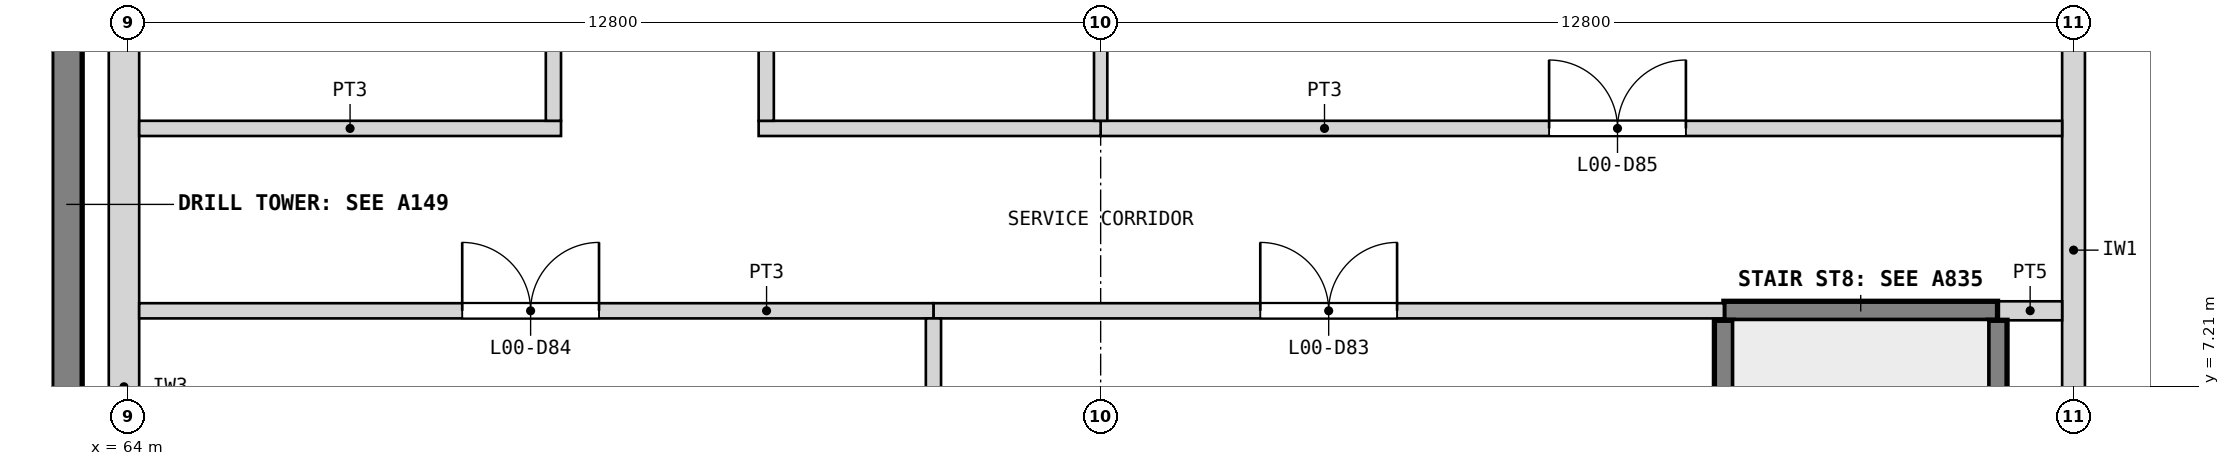
"""IFC4 building model, lengths in metres.
Left out: names, types, materials, properties, quantities, classifications, styles, units other than length and angle.
Written with IfcOpenShell. Run it as: python <this file> out.ifc"""

import sys

from ifc_helpers import new_model, si_unit, direction, frame, frame_2d, origin, place, context, subcontext, project, spatial, rectangle, extrude, element, fill, save


model = new_model("IFC4")
c1 = context("Model", 3, precision=1e-05, world=origin(), true_north=direction((0.0, 1.0)))
c2 = subcontext(c1, "Body", "Model", "MODEL_VIEW")
j1 = project(units=[si_unit("LENGTHUNIT", "METRE"), si_unit("PLANEANGLEUNIT", "RADIAN")], contexts=[c1])
p1 = place(None, origin())
s1 = spatial("IfcSite", under=j1, at=p1, CompositionType="ELEMENT")
p2 = place(p1, origin())
s2 = spatial("IfcBuilding", under=s1, at=p2, CompositionType="ELEMENT")
p3 = place(p2, origin())
s3 = spatial("IfcBuildingStorey", under=s2, at=p3, CompositionType="ELEMENT", Elevation=0.0)
p4 = place(p3, frame((63.2, 5.0, -0.25), z_axis=(0.0, 0.0, 1.0), x_axis=(0.0, 1.0, 0.0)))
e1 = element("IfcWall", 1, at=p4, inside=s3, PredefinedType="SHEAR", context=c2, shape_type="SweptSolid", body=[
    extrude(rectangle(XDim=9.2, YDim=0.4, at=frame_2d((4.6, 0.0))), origin(), (0.0, 0.0, 1.0), 4.45),
])
p5 = place(p3, frame((89.6, 0.35, 0.0), z_axis=(0.0, 0.0, 1.0), x_axis=(0.0, 1.0, 0.0)))
e2 = element("IfcWall", 2, at=p5, inside=s3, PredefinedType="SOLIDWALL", context=c2, shape_type="SweptSolid", body=[
    extrude(rectangle(XDim=13.7, YDim=0.3, at=frame_2d((6.85, 0.0))), origin(), (0.0, 0.0, 1.0), 3.0),
])
p6 = place(p5, frame((0.65, 0.0, 0.3)))
e3 = element("IfcOpeningElement", 3, at=p6, cuts=e2, PredefinedType="OPENING", context=c2, shape_type="SweptSolid", body=[
    extrude(rectangle(XDim=1.6, YDim=2.4, at=frame_2d((0.8, 1.2))), frame((0.0, 0.16, 0.0), z_axis=(0.0, -1.0, 0.0), x_axis=(1.0, 0.0, 0.0)), (0.0, 0.0, 1.0), 0.32),
])
p7 = place(p5, frame((4.25, 0.0, 0.3)))
e4 = element("IfcOpeningElement", 4, at=p7, cuts=e2, PredefinedType="OPENING", context=c2, shape_type="SweptSolid", body=[
    extrude(rectangle(XDim=1.6, YDim=2.4, at=frame_2d((0.8, 1.2))), frame((0.0, 0.16, 0.0), z_axis=(0.0, -1.0, 0.0), x_axis=(1.0, 0.0, 0.0)), (0.0, 0.0, 1.0), 0.32),
])
p8 = place(p5, frame((11.45, 0.0, 0.3)))
e5 = element("IfcOpeningElement", 5, at=p8, cuts=e2, PredefinedType="OPENING", context=c2, shape_type="SweptSolid", body=[
    extrude(rectangle(XDim=1.6, YDim=2.4, at=frame_2d((0.8, 1.2))), frame((0.0, 0.16, 0.0), z_axis=(0.0, -1.0, 0.0), x_axis=(1.0, 0.0, 0.0)), (0.0, 0.0, 1.0), 0.32),
])
p9 = place(p3, frame((63.95, 0.35, 0.0), z_axis=(0.0, 0.0, 1.0), x_axis=(0.0, 1.0, 0.0)))
e6 = element("IfcWall", 6, at=p9, inside=s3, PredefinedType="SOLIDWALL", context=c2, shape_type="SweptSolid", body=[
    extrude(rectangle(XDim=13.7, YDim=0.4, at=frame_2d((6.85, 0.0))), origin(), (0.0, 0.0, 1.0), 3.0),
])
p10 = place(p9, frame((0.65, 0.0, 0.3)))
e7 = element("IfcOpeningElement", 7, at=p10, cuts=e6, PredefinedType="OPENING", context=c2, shape_type="SweptSolid", body=[
    extrude(rectangle(XDim=1.6, YDim=2.4, at=frame_2d((0.8, 1.2))), frame((0.0, 0.21, 0.0), z_axis=(0.0, -1.0, 0.0), x_axis=(1.0, 0.0, 0.0)), (0.0, 0.0, 1.0), 0.42),
])
p11 = place(p9, frame((11.45, 0.0, 0.3)))
e8 = element("IfcOpeningElement", 8, at=p11, cuts=e6, PredefinedType="OPENING", context=c2, shape_type="SweptSolid", body=[
    extrude(rectangle(XDim=1.6, YDim=2.4, at=frame_2d((0.8, 1.2))), frame((0.0, 0.21, 0.0), z_axis=(0.0, -1.0, 0.0), x_axis=(1.0, 0.0, 0.0)), (0.0, 0.0, 1.0), 0.42),
])
p12 = place(p3, frame((89.45, 8.2, 0.0), z_axis=(0.0, 0.0, 1.0), x_axis=(-1.0, 0.0, 0.0)))
e9 = element("IfcWall", 9, at=p12, inside=s3, PredefinedType="PARTITIONING", context=c2, shape_type="SweptSolid", body=[
    extrude(rectangle(XDim=0.85, YDim=0.25, at=frame_2d((0.425, 0.0))), origin(), (0.0, 0.0, 1.0), 3.9),
])
p13 = place(p3, frame((88.6, 8.2, 0.0), z_axis=(0.0, 0.0, 1.0), x_axis=(-1.0, 0.0, 0.0)))
e10 = element("IfcWall", 10, at=p13, inside=s3, PredefinedType="SHEAR", context=c2, shape_type="SweptSolid", body=[
    extrude(rectangle(XDim=3.6, YDim=0.25, at=frame_2d((1.8, 0.0))), origin(), (0.0, 0.0, 1.0), 3.9),
])
p14 = place(p3, frame((85.0, 8.2, 0.0), z_axis=(0.0, 0.0, 1.0), x_axis=(-1.0, 0.0, 0.0)))
e11 = element("IfcWall", 11, at=p14, inside=s3, PredefinedType="PARTITIONING", context=c2, shape_type="SweptSolid", body=[
    extrude(rectangle(XDim=10.4, YDim=0.2, at=frame_2d((5.2, 0.0))), origin(), (0.0, 0.0, 1.0), 3.9),
])
p15 = place(p14, frame((4.3, 0.0, 0.0)))
e12 = element("IfcOpeningElement", 12, at=p15, cuts=e11, PredefinedType="OPENING", context=c2, shape_type="SweptSolid", body=[
    extrude(rectangle(XDim=1.8, YDim=2.1, at=frame_2d((0.9, 1.05))), frame((0.0, 0.11, 0.0), z_axis=(0.0, -1.0, 0.0), x_axis=(1.0, 0.0, 0.0)), (0.0, 0.0, 1.0), 0.22),
])
p16 = place(p3, frame((74.6, 8.2, 0.0), z_axis=(0.0, 0.0, 1.0), x_axis=(-1.0, 0.0, 0.0)))
e13 = element("IfcWall", 13, at=p16, inside=s3, PredefinedType="PARTITIONING", context=c2, shape_type="SweptSolid", body=[
    extrude(rectangle(XDim=10.45, YDim=0.2, at=frame_2d((5.225, 0.0))), origin(), (0.0, 0.0, 1.0), 3.9),
])
p17 = place(p16, frame((4.4, 0.0, 0.0)))
e14 = element("IfcOpeningElement", 14, at=p17, cuts=e13, PredefinedType="OPENING", context=c2, shape_type="SweptSolid", body=[
    extrude(rectangle(XDim=1.8, YDim=2.1, at=frame_2d((0.9, 1.05))), frame((0.0, 0.11, 0.0), z_axis=(0.0, -1.0, 0.0), x_axis=(1.0, 0.0, 0.0)), (0.0, 0.0, 1.0), 0.22),
])
p18 = place(p3, frame((89.45, 10.6, 0.0), z_axis=(0.0, 0.0, 1.0), x_axis=(-1.0, 0.0, 0.0)))
e15 = element("IfcWall", 15, at=p18, inside=s3, PredefinedType="PARTITIONING", context=c2, shape_type="SweptSolid", body=[
    extrude(rectangle(XDim=12.65, YDim=0.2, at=frame_2d((6.325, 0.0))), origin(), (0.0, 0.0, 1.0), 3.9),
])
p19 = place(p18, frame((4.95, 0.0, 0.0)))
e16 = element("IfcOpeningElement", 16, at=p19, cuts=e15, PredefinedType="OPENING", context=c2, shape_type="SweptSolid", body=[
    extrude(rectangle(XDim=1.8, YDim=2.1, at=frame_2d((0.9, 1.05))), frame((0.0, 0.11, 0.0), z_axis=(0.0, -1.0, 0.0), x_axis=(1.0, 0.0, 0.0)), (0.0, 0.0, 1.0), 0.22),
])
p20 = place(p3, frame((76.8, 10.6, 0.0), z_axis=(0.0, 0.0, 1.0), x_axis=(-1.0, 0.0, 0.0)))
e17 = element("IfcWall", 17, at=p20, inside=s3, PredefinedType="PARTITIONING", context=c2, shape_type="SweptSolid", body=[
    extrude(rectangle(XDim=4.5, YDim=0.2, at=frame_2d((2.25, 0.0))), origin(), (0.0, 0.0, 1.0), 3.9),
])
p21 = place(p3, frame((69.7, 10.6, 0.0), z_axis=(0.0, 0.0, 1.0), x_axis=(-1.0, 0.0, 0.0)))
e18 = element("IfcWall", 18, at=p21, inside=s3, PredefinedType="PARTITIONING", context=c2, shape_type="SweptSolid", body=[
    extrude(rectangle(XDim=5.55, YDim=0.2, at=frame_2d((2.775, 0.0))), origin(), (0.0, 0.0, 1.0), 3.9),
])
p22 = place(p3, frame((88.6, 2.325, 0.0), z_axis=(0.0, 0.0, 1.0), x_axis=(0.0, 1.0, 0.0)))
e19 = element("IfcWall", 19, at=p22, inside=s3, PredefinedType="SHEAR", context=c2, shape_type="SweptSolid", body=[
    extrude(rectangle(XDim=5.75, YDim=0.25, at=frame_2d((2.875, 0.0))), origin(), (0.0, 0.0, 1.0), 3.9),
])
p23 = place(p3, frame((85.0, 2.325, 0.0), z_axis=(0.0, 0.0, 1.0), x_axis=(0.0, 1.0, 0.0)))
e20 = element("IfcWall", 20, at=p23, inside=s3, PredefinedType="SHEAR", context=c2, shape_type="SweptSolid", body=[
    extrude(rectangle(XDim=5.75, YDim=0.25, at=frame_2d((2.875, 0.0))), origin(), (0.0, 0.0, 1.0), 3.9),
])
p24 = place(p23, frame((0.105, 0.0, 0.0)))
e21 = element("IfcOpeningElement", 21, at=p24, cuts=e20, PredefinedType="OPENING", context=c2, shape_type="SweptSolid", body=[
    extrude(rectangle(XDim=1.2, YDim=2.1, at=frame_2d((0.6, 1.05))), frame((0.0, 0.135, 0.0), z_axis=(0.0, -1.0, 0.0), x_axis=(1.0, 0.0, 0.0)), (0.0, 0.0, 1.0), 0.27),
])
p25 = place(p3, frame((76.8, 10.7, 0.0), z_axis=(0.0, 0.0, 1.0), x_axis=(0.0, 1.0, 0.0)))
e22 = element("IfcWall", 22, at=p25, inside=s3, PredefinedType="PARTITIONING", context=c2, shape_type="SweptSolid", body=[
    extrude(rectangle(XDim=3.3, YDim=0.175, at=frame_2d((1.65, 0.0))), origin(), (0.0, 0.0, 1.0), 3.0),
])
p26 = place(p3, frame((74.6, 0.15, 0.0), z_axis=(0.0, 0.0, 1.0), x_axis=(0.0, 1.0, 0.0)))
e23 = element("IfcWall", 23, at=p26, inside=s3, PredefinedType="PARTITIONING", context=c2, shape_type="SweptSolid", body=[
    extrude(rectangle(XDim=7.95, YDim=0.2, at=frame_2d((3.975, 0.0))), origin(), (0.0, 0.0, 1.0), 3.9),
])
p27 = place(p26, frame((2.95, 0.0, 0.0)))
e24 = element("IfcOpeningElement", 24, at=p27, cuts=e23, PredefinedType="OPENING", context=c2, shape_type="SweptSolid", body=[
    extrude(rectangle(XDim=1.8, YDim=2.1, at=frame_2d((0.9, 1.05))), frame((0.0, 0.11, 0.0), z_axis=(0.0, -1.0, 0.0), x_axis=(1.0, 0.0, 0.0)), (0.0, 0.0, 1.0), 0.22),
])
p28 = place(p3, frame((72.4, 10.7, 0.0), z_axis=(0.0, 0.0, 1.0), x_axis=(0.0, 1.0, 0.0)))
e25 = element("IfcWall", 25, at=p28, inside=s3, PredefinedType="PARTITIONING", context=c2, shape_type="SweptSolid", body=[
    extrude(rectangle(XDim=4.012, YDim=0.2, at=frame_2d((2.006, 0.0))), origin(), (0.0, 0.0, 1.0), 3.9),
])
p29 = place(p28, frame((1.5, 0.0, 0.0)))
e26 = element("IfcOpeningElement", 26, at=p29, cuts=e25, PredefinedType="OPENING", context=c2, shape_type="SweptSolid", body=[
    extrude(rectangle(XDim=1.0, YDim=2.1, at=frame_2d((0.5, 1.05))), frame((0.0, 0.11, 0.0), z_axis=(0.0, -1.0, 0.0), x_axis=(1.0, 0.0, 0.0)), (0.0, 0.0, 1.0), 0.22),
])
p30 = place(p3, frame((69.6, 10.7, 0.0), z_axis=(0.0, 0.0, 1.0), x_axis=(0.0, 1.0, 0.0)))
e27 = element("IfcWall", 27, at=p30, inside=s3, PredefinedType="PARTITIONING", context=c2, shape_type="SweptSolid", body=[
    extrude(rectangle(XDim=18.0, YDim=0.2, at=frame_2d((9.0, 0.0))), origin(), (0.0, 0.0, 1.0), 3.9),
])
p31 = place(p30, frame((3.4, 0.0, 0.0)))
e28 = element("IfcOpeningElement", 28, at=p31, cuts=e27, PredefinedType="OPENING", context=c2, shape_type="SweptSolid", body=[
    extrude(rectangle(XDim=1.8, YDim=2.1, at=frame_2d((0.9, 1.05))), frame((0.0, 0.11, 0.0), z_axis=(0.0, -1.0, 0.0), x_axis=(1.0, 0.0, 0.0)), (0.0, 0.0, 1.0), 0.22),
])
p32 = place(p15, frame((1.8, 0.0, 0.0), z_axis=(0.0, 0.0, 1.0), x_axis=(-1.0, 0.0, 0.0)))
e29 = element("IfcDoor", 29, at=p32, inside=s3, OperationType="DOUBLE_DOOR_SINGLE_SWING", PredefinedType="DOOR", context=c2, shape_type="SweptSolid", body=[
    extrude(rectangle(XDim=1.8, YDim=2.1, at=frame_2d((0.9, 1.05))), frame((0.0, 0.025, 0.0), z_axis=(0.0, -1.0, 0.0), x_axis=(1.0, 0.0, 0.0)), (0.0, 0.0, 1.0), 0.05),
])
fill(e12, e29)
p33 = place(p17, frame((1.8, 0.0, 0.0), z_axis=(0.0, 0.0, 1.0), x_axis=(-1.0, 0.0, 0.0)))
e30 = element("IfcDoor", 30, at=p33, inside=s3, OperationType="DOUBLE_DOOR_SINGLE_SWING", PredefinedType="DOOR", context=c2, shape_type="SweptSolid", body=[
    extrude(rectangle(XDim=1.8, YDim=2.1, at=frame_2d((0.9, 1.05))), frame((0.0, 0.025, 0.0), z_axis=(0.0, -1.0, 0.0), x_axis=(1.0, 0.0, 0.0)), (0.0, 0.0, 1.0), 0.05),
])
fill(e14, e30)
p34 = place(p19, frame((1.8, 0.0, 0.0), z_axis=(0.0, 0.0, 1.0), x_axis=(-1.0, 0.0, 0.0)))
e31 = element("IfcDoor", 31, at=p34, inside=s3, OperationType="DOUBLE_DOOR_SINGLE_SWING", PredefinedType="DOOR", context=c2, shape_type="SweptSolid", body=[
    extrude(rectangle(XDim=1.8, YDim=2.1, at=frame_2d((0.9, 1.05))), frame((0.0, 0.025, 0.0), z_axis=(0.0, -1.0, 0.0), x_axis=(1.0, 0.0, 0.0)), (0.0, 0.0, 1.0), 0.05),
])
fill(e16, e31)
save(model, sys.argv[1])
